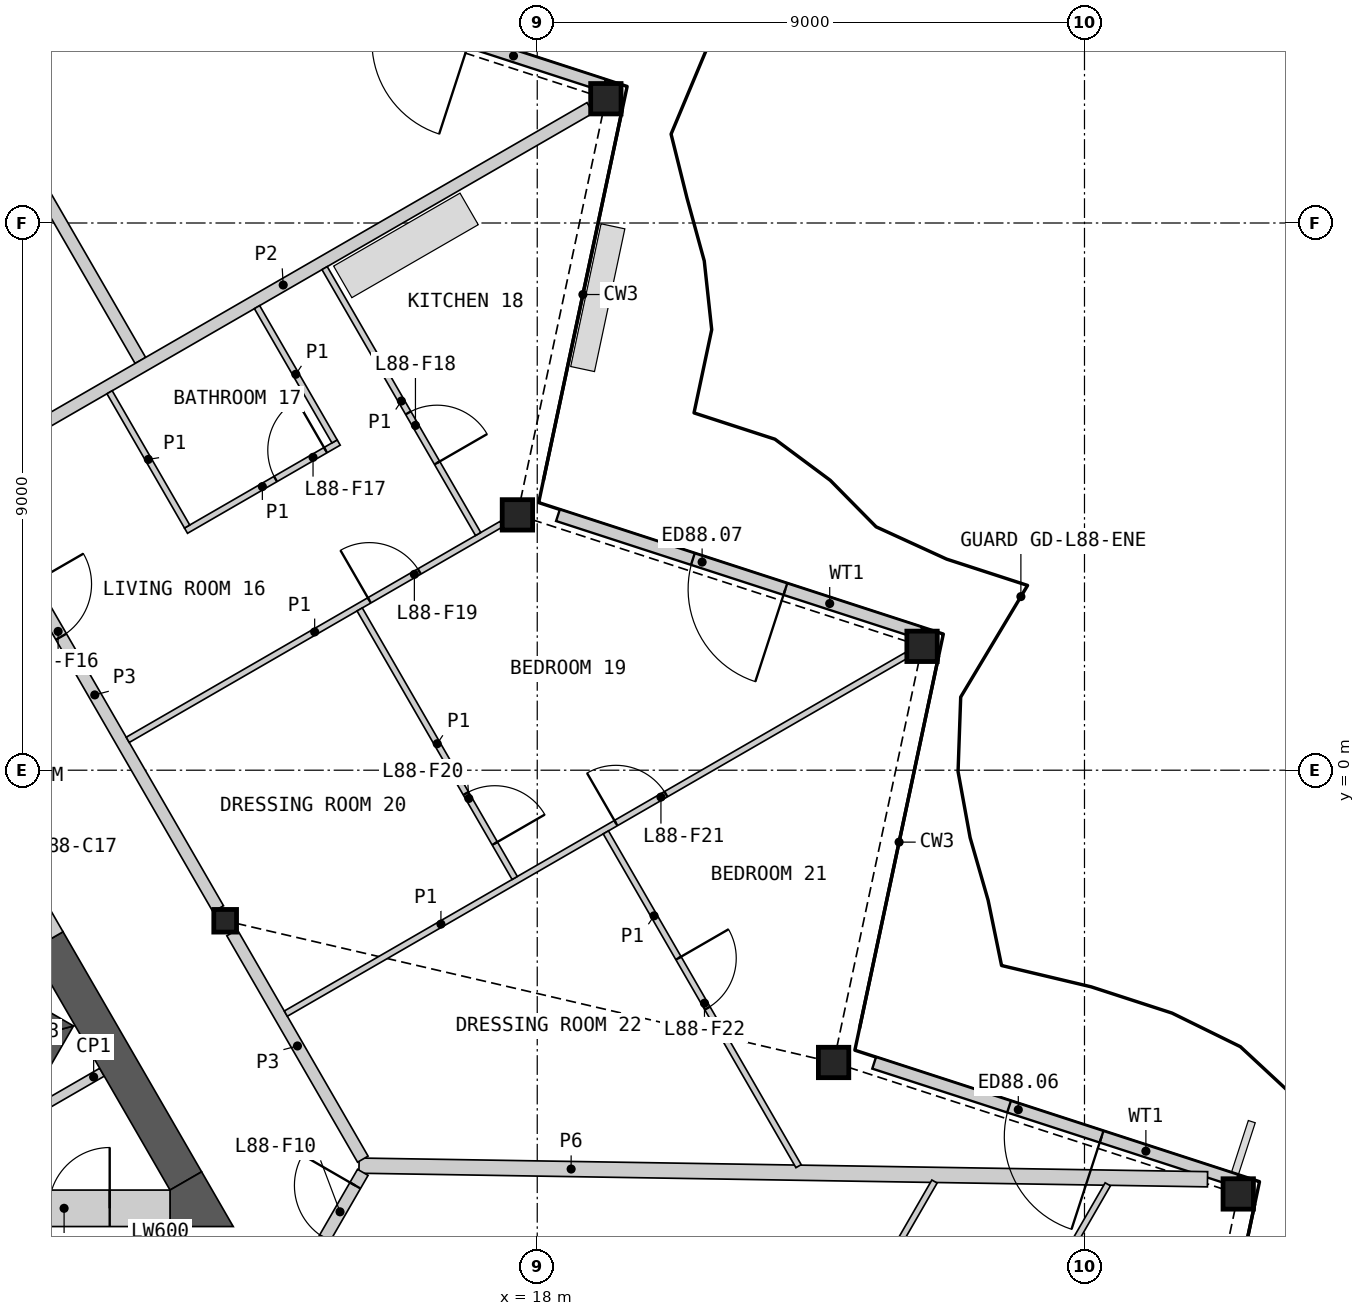
"""IFC4 building model, lengths in metres.
Left out: names, types, materials, properties, quantities, classifications, styles, units other than length and angle.
Written with IfcOpenShell. Run it as: python <this file> out.ifc"""

import sys

from ifc_helpers import new_model, si_unit, direction, frame, frame_2d, origin, origin_2d, place, context, subcontext, project, spatial, polyline, rectangle, hollow_rectangle, i_section, outline, extrude, element, fill, save


model = new_model("IFC4")
c1 = context("Model", 3, precision=1e-05, world=origin(), true_north=direction((0.0, 1.0)))
c2 = subcontext(c1, "Body", "Model", "MODEL_VIEW")
j1 = project(units=[si_unit("LENGTHUNIT", "METRE"), si_unit("PLANEANGLEUNIT", "RADIAN")], contexts=[c1])
p1 = place(None, origin())
s1 = spatial("IfcSite", under=j1, at=p1, CompositionType="ELEMENT")
p2 = place(p1, origin())
s2 = spatial("IfcBuilding", under=s1, at=p2, CompositionType="ELEMENT")
p3 = place(p2, frame((0.0, 0.0, 388.2)))
s3 = spatial("IfcBuildingStorey", under=s2, at=p3, CompositionType="ELEMENT", Elevation=388.2)
for number, where, z_axis, x_axis in (
    (1, (29.529, -6.969, 0.0), (0.0, 0.0, 1.0), (1.0, 0.0, 0.0)),
    (2, (22.874, -4.807, 0.0), (0.0, 0.0, 1.0), (1.0, 0.0, 0.0)),
    (3, (24.329, 2.037, 0.0), (0.0, 0.0, 1.0), (1.0, 0.0, 0.0)),
    (4, (17.674, 4.199, 0.0), (0.0, 0.0, 1.0), (1.0, 0.0, 0.0)),
    (5, (19.129, 11.044, 0.0), (0.0, 0.0, 1.0), (1.0, 0.0, 0.0)),
):
    element("IfcColumn", number, at=place(p3, frame(where, z_axis=z_axis, x_axis=x_axis)), inside=s3, PredefinedType="COLUMN", context=c2, shape_type="SweptSolid", body=[
        extrude(hollow_rectangle(XDim=0.5, YDim=0.5, WallThickness=0.03, at=origin_2d()), origin(), (0.0, 0.0, 1.0), 3.4),
    ])
p4 = place(p3, frame((12.868, -2.476, 0.0), z_axis=(0.0, 0.0, 1.0), x_axis=(1.0, 0.0, 0.0)))
e6 = element("IfcColumn", 6, at=p4, inside=s3, PredefinedType="COLUMN", context=c2, shape_type="SweptSolid", body=[
    extrude(i_section(OverallWidth=0.374, OverallDepth=0.372, WebThickness=0.016, FlangeThickness=0.026, at=origin_2d()), origin(), (0.0, 0.0, 1.0), 3.4),
])
p5 = place(p3, frame((29.5, -6.75, 0.0), z_axis=(0.0, 0.0, 1.0), x_axis=(-0.951060123915, 0.309005891041, 0.0)))
e7 = element("IfcWall", 7, at=p5, inside=s3, PredefinedType="SOLIDWALL", context=c2, shape_type="SweptSolid", body=[
    extrude(rectangle(XDim=6.265, YDim=0.2, at=frame_2d((3.133, 0.0))), origin(), (0.0, 0.0, 1.0), 2.634),
])
p6 = place(p5, frame((2.333, 0.0, 0.0)))
e8 = element("IfcOpeningElement", 8, at=p6, cuts=e7, PredefinedType="OPENING", context=c2, shape_type="SweptSolid", body=[
    extrude(rectangle(XDim=1.6, YDim=2.25, at=frame_2d((0.8, 1.125))), frame((0.0, 0.11, 0.0), z_axis=(0.0, -1.0, 0.0), x_axis=(1.0, 0.0, 0.0)), (0.0, 0.0, 1.0), 0.22),
])
p7 = place(p3, frame((24.3, 2.257, 0.0), z_axis=(0.0, 0.0, 1.0), x_axis=(-0.951060123915, 0.309005891041, 0.0)))
e9 = element("IfcWall", 9, at=p7, inside=s3, PredefinedType="SOLIDWALL", context=c2, shape_type="SweptSolid", body=[
    extrude(rectangle(XDim=6.265, YDim=0.2, at=frame_2d((3.133, 0.0))), origin(), (0.0, 0.0, 1.0), 2.634),
])
p8 = place(p7, frame((2.333, 0.0, 0.0)))
e10 = element("IfcOpeningElement", 10, at=p8, cuts=e9, PredefinedType="OPENING", context=c2, shape_type="SweptSolid", body=[
    extrude(rectangle(XDim=1.6, YDim=2.25, at=frame_2d((0.8, 1.125))), frame((0.0, 0.11, 0.0), z_axis=(0.0, -1.0, 0.0), x_axis=(1.0, 0.0, 0.0)), (0.0, 0.0, 1.0), 0.22),
])
p9 = place(p3, frame((19.099, 11.264, 0.0), z_axis=(0.0, 0.0, 1.0), x_axis=(-0.951056402988, 0.3090173431, 0.0)))
e11 = element("IfcWall", 11, at=p9, inside=s3, PredefinedType="SOLIDWALL", context=c2, shape_type="SweptSolid", body=[
    extrude(rectangle(XDim=6.265, YDim=0.2, at=frame_2d((3.133, 0.0))), origin(), (0.0, 0.0, 1.0), 2.634),
])
p10 = place(p9, frame((2.333, 0.0, 0.0)))
e12 = element("IfcOpeningElement", 12, at=p10, cuts=e11, PredefinedType="OPENING", context=c2, shape_type="SweptSolid", body=[
    extrude(rectangle(XDim=1.6, YDim=2.25, at=frame_2d((0.8, 1.125))), frame((0.0, 0.11, 0.0), z_axis=(0.0, -1.0, 0.0), x_axis=(1.0, 0.0, 0.0)), (0.0, 0.0, 1.0), 0.22),
])
p11 = place(p3, origin())
e13 = element("IfcWall", 13, at=p11, inside=s3, PredefinedType="SHEAR", context=c2, shape_type="SweptSolid", body=[
    extrude(outline(polyline([(8.83, -6.881), (10.374, -4.206), (10.032, -4.298), (8.738, -6.539), (8.83, -6.881)])), origin(), (0.0, 0.0, 1.0), 3.1),
])
p12 = place(p3, origin())
e14 = element("IfcWall", 14, at=p12, inside=s3, PredefinedType="SHEAR", context=c2, shape_type="SweptSolid", body=[
    extrude(outline(polyline([(10.032, -4.298), (10.374, -4.206), (5.307, -1.281), (5.182, -1.498), (10.032, -4.298)])), origin(), (0.0, 0.0, 1.0), 3.1),
])
p13 = place(p3, frame((10.842, -4.967, 0.0), z_axis=(0.0, 0.0, 1.0), x_axis=(-0.866098216386, -0.499873863663, 0.0)))
e15 = element("IfcWall", 15, at=p13, inside=s3, PredefinedType="PARTITIONING", context=c2, shape_type="SweptSolid", body=[
    extrude(rectangle(XDim=1.582, YDim=0.15, at=frame_2d((0.791, 0.0))), origin(), (0.0, 0.0, 1.0), 3.1),
])
p14 = place(p3, frame((12.221, -6.756, 0.0), z_axis=(0.0, 0.0, 1.0), x_axis=(-0.500020646047, 0.866013483456, 0.0)))
e16 = element("IfcWall", 16, at=p14, inside=s3, PredefinedType="SHEAR", context=c2, shape_type="SweptSolid", body=[
    extrude(rectangle(XDim=4.559, YDim=0.6, at=frame_2d((2.28, 0.0))), origin(), (0.0, 0.0, 1.0), 3.1),
])
p15 = place(p3, origin())
e17 = element("IfcWall", 17, at=p15, inside=s3, PredefinedType="SHEAR", context=c2, shape_type="SweptSolid", body=[
    extrude(outline(polyline([(11.961, -7.506), (11.961, -6.906), (12.48, -6.606), (13.0, -7.506), (11.961, -7.506)])), origin(), (0.0, 0.0, 1.0), 3.1),
])
p16 = place(p3, frame((9.369, -7.206, 0.0), z_axis=(0.0, 0.0, 1.0), x_axis=(1.0, 0.0, 0.0)))
e18 = element("IfcWall", 18, at=p16, inside=s3, PredefinedType="SHEAR", context=c2, shape_type="SweptSolid", body=[
    extrude(rectangle(XDim=2.592, YDim=0.6, at=frame_2d((1.296, 0.0))), origin(), (0.0, 0.0, 1.0), 3.1),
])
p17 = place(p16, frame((0.6, 0.0, 0.0)))
e19 = element("IfcOpeningElement", 19, at=p17, cuts=e18, PredefinedType="OPENING", context=c2, shape_type="SweptSolid", body=[
    extrude(rectangle(XDim=1.0, YDim=2.1, at=frame_2d((0.5, 1.05))), frame((0.0, 0.31, 0.0), z_axis=(0.0, -1.0, 0.0), x_axis=(1.0, 0.0, 0.0)), (0.0, 0.0, 1.0), 0.62),
])
p18 = place(p3, frame((9.941, -2.807, 0.0), z_axis=(0.0, 0.0, 1.0), x_axis=(-0.499994660107, 0.866028486751, 0.0)))
e20 = element("IfcWall", 20, at=p18, inside=s3, PredefinedType="SHEAR", context=c2, shape_type="SweptSolid", body=[
    extrude(rectangle(XDim=2.2, YDim=0.6, at=frame_2d((1.1, 0.0))), origin(), (0.0, 0.0, 1.0), 3.1),
])
p19 = place(p18, frame((0.6, 0.0, 0.0)))
e21 = element("IfcOpeningElement", 21, at=p19, cuts=e20, PredefinedType="OPENING", context=c2, shape_type="SweptSolid", body=[
    extrude(rectangle(XDim=1.0, YDim=2.1, at=frame_2d((0.5, 1.05))), frame((0.0, 0.31, 0.0), z_axis=(0.0, -1.0, 0.0), x_axis=(1.0, 0.0, 0.0)), (0.0, 0.0, 1.0), 0.62),
])
p20 = place(p3, frame((15.069, -6.503, 0.0), z_axis=(0.0, 0.0, 1.0), x_axis=(0.999870484296, -0.016093931549, 0.0)))
e22 = element("IfcWall", 22, at=p20, inside=s3, PredefinedType="PARTITIONING", context=c2, shape_type="SweptSolid", body=[
    extrude(rectangle(XDim=13.956, YDim=0.25, at=frame_2d((6.978, 0.0))), origin(), (0.0, 0.0, 1.0), 2.33),
])
p21 = place(p3, frame((8.692, 4.756, 0.0), z_axis=(0.0, 0.0, 1.0), x_axis=(0.500001682468, -0.866024432409, 0.0)))
e23 = element("IfcWall", 23, at=p21, inside=s3, PredefinedType="PARTITIONING", context=c2, shape_type="SweptSolid", body=[
    extrude(rectangle(XDim=8.124, YDim=0.2, at=frame_2d((4.062, 0.0))), origin(), (0.0, 0.0, 1.0), 3.1),
])
p22 = place(p21, frame((1.956, 0.0, 0.0)))
e24 = element("IfcOpeningElement", 24, at=p22, cuts=e23, PredefinedType="OPENING", context=c2, shape_type="SweptSolid", body=[
    extrude(rectangle(XDim=1.0, YDim=2.1, at=frame_2d((0.5, 1.05))), frame((0.0, 0.11, 0.0), z_axis=(0.0, -1.0, 0.0), x_axis=(1.0, 0.0, 0.0)), (0.0, 0.0, 1.0), 0.22),
])
p23 = place(p3, frame((12.981, -2.673, 0.0), z_axis=(0.0, 0.0, 1.0), x_axis=(0.499986217557, -0.866033360935, 0.0)))
e25 = element("IfcWall", 25, at=p23, inside=s3, PredefinedType="PARTITIONING", context=c2, shape_type="SweptSolid", body=[
    extrude(rectangle(XDim=4.3, YDim=0.2, at=frame_2d((2.15, 0.0))), origin(), (0.0, 0.0, 1.0), 3.1),
])
p24 = place(p3, frame((13.281, -9.819, 0.0), z_axis=(0.0, 0.0, 1.0), x_axis=(0.499948957823, 0.866054870994, 0.0)))
e26 = element("IfcWall", 26, at=p24, inside=s3, PredefinedType="PARTITIONING", context=c2, shape_type="SweptSolid", body=[
    extrude(rectangle(XDim=3.701, YDim=0.2, at=frame_2d((1.851, 0.0))), origin(), (0.0, 0.0, 1.0), 3.1),
])
p25 = place(p24, frame((2.451, 0.0, 0.0)))
e27 = element("IfcOpeningElement", 27, at=p25, cuts=e26, PredefinedType="OPENING", context=c2, shape_type="SweptSolid", body=[
    extrude(rectangle(XDim=1.0, YDim=2.1, at=frame_2d((0.5, 1.05))), frame((0.0, 0.11, 0.0), z_axis=(0.0, -1.0, 0.0), x_axis=(1.0, 0.0, 0.0)), (0.0, 0.0, 1.0), 0.22),
])
p26 = place(p3, frame((3.926, 19.811, 0.0), z_axis=(0.0, 0.0, 1.0), x_axis=(0.500001082559, -0.866024778768, 0.0)))
e28 = element("IfcWall", 28, at=p26, inside=s3, PredefinedType="PARTITIONING", context=c2, shape_type="SweptSolid", body=[
    extrude(rectangle(XDim=15.094, YDim=0.2, at=frame_2d((7.547, 0.0))), origin(), (0.0, 0.0, 1.0), 2.33),
])
p27 = place(p26, frame((3.761, 0.0, 0.0)))
e29 = element("IfcOpeningElement", 29, at=p27, cuts=e28, PredefinedType="OPENING", context=c2, shape_type="SweptSolid", body=[
    extrude(rectangle(XDim=0.95, YDim=2.1, at=frame_2d((0.475, 1.05))), frame((0.0, 0.11, 0.0), z_axis=(0.0, -1.0, 0.0), x_axis=(1.0, 0.0, 0.0)), (0.0, 0.0, 1.0), 0.22),
])
p28 = place(p3, frame((8.775, 5.066, 0.0), z_axis=(0.0, 0.0, 1.0), x_axis=(0.866023724155, 0.500002909193, 0.0)))
e30 = element("IfcWall", 30, at=p28, inside=s3, PredefinedType="PARTITIONING", context=c2, shape_type="SweptSolid", body=[
    extrude(rectangle(XDim=11.655, YDim=0.2, at=frame_2d((5.827, 0.0))), origin(), (0.0, 0.0, 1.0), 2.33),
])
p29 = place(p3, frame((13.865, -4.004, 0.0), z_axis=(0.0, 0.0, 1.0), x_axis=(0.866023404247, 0.500003463284, 0.0)))
e31 = element("IfcWall", 31, at=p29, inside=s3, PredefinedType="PARTITIONING", context=c2, shape_type="SweptSolid", body=[
    extrude(rectangle(XDim=11.782, YDim=0.1, at=frame_2d((5.891, 0.0))), origin(), (0.0, 0.0, 1.0), 2.33),
])
p30 = place(p29, frame((6.269, 0.0, 0.0)))
e32 = element("IfcOpeningElement", 32, at=p30, cuts=e31, PredefinedType="OPENING", context=c2, shape_type="SweptSolid", body=[
    extrude(rectangle(XDim=0.95, YDim=2.1, at=frame_2d((0.475, 1.05))), frame((0.0, 0.06, 0.0), z_axis=(0.0, -1.0, 0.0), x_axis=(1.0, 0.0, 0.0)), (0.0, 0.0, 1.0), 0.12),
])
p31 = place(p3, frame((23.512, -13.517, 0.0), z_axis=(0.0, 0.0, 1.0), x_axis=(0.49998445949, 0.866034375916, 0.0)))
e33 = element("IfcWall", 33, at=p31, inside=s3, PredefinedType="PARTITIONING", context=c2, shape_type="SweptSolid", body=[
    extrude(rectangle(XDim=7.743, YDim=0.1, at=frame_2d((3.872, 0.0))), origin(), (0.0, 0.0, 1.0), 2.33),
])
p32 = place(p31, frame((3.397, 0.0, 0.0)))
e34 = element("IfcOpeningElement", 34, at=p32, cuts=e33, PredefinedType="OPENING", context=c2, shape_type="SweptSolid", body=[
    extrude(rectangle(XDim=0.95, YDim=2.1, at=frame_2d((0.475, 1.05))), frame((0.0, 0.06, 0.0), z_axis=(0.0, -1.0, 0.0), x_axis=(1.0, 0.0, 0.0)), (0.0, 0.0, 1.0), 0.12),
])
p33 = place(p3, frame((11.265, 0.5, 0.0), z_axis=(0.0, 0.0, 1.0), x_axis=(0.866033839264, 0.499985389037, 0.0)))
e35 = element("IfcWall", 35, at=p33, inside=s3, PredefinedType="PARTITIONING", context=c2, shape_type="SweptSolid", body=[
    extrude(rectangle(XDim=7.1, YDim=0.1, at=frame_2d((3.55, 0.0))), origin(), (0.0, 0.0, 1.0), 2.33),
])
p34 = place(p33, frame((4.588, 0.0, 0.0)))
e36 = element("IfcOpeningElement", 36, at=p34, cuts=e35, PredefinedType="OPENING", context=c2, shape_type="SweptSolid", body=[
    extrude(rectangle(XDim=0.95, YDim=2.1, at=frame_2d((0.475, 1.05))), frame((0.0, 0.06, 0.0), z_axis=(0.0, -1.0, 0.0), x_axis=(1.0, 0.0, 0.0)), (0.0, 0.0, 1.0), 0.12),
])
p35 = place(p3, frame((21.354, -12.271, 0.0), z_axis=(0.0, 0.0, 1.0), x_axis=(0.499983931063, 0.866034680991, 0.0)))
e37 = element("IfcWall", 37, at=p35, inside=s3, PredefinedType="PARTITIONING", context=c2, shape_type="SweptSolid", body=[
    extrude(rectangle(XDim=6.358, YDim=0.1, at=frame_2d((3.179, 0.0))), origin(), (0.0, 0.0, 1.0), 2.33),
])
p36 = place(p35, frame((1.252, 0.0, 0.0)))
e38 = element("IfcOpeningElement", 38, at=p36, cuts=e37, PredefinedType="OPENING", context=c2, shape_type="SweptSolid", body=[
    extrude(rectangle(XDim=0.95, YDim=2.1, at=frame_2d((0.475, 1.05))), frame((0.0, 0.06, 0.0), z_axis=(0.0, -1.0, 0.0), x_axis=(1.0, 0.0, 0.0)), (0.0, 0.0, 1.0), 0.12),
])
p37 = place(p3, frame((19.128, -1.023, 0.0), z_axis=(0.0, 0.0, 1.0), x_axis=(0.499991387631, -0.866030376081, 0.0)))
e39 = element("IfcWall", 39, at=p37, inside=s3, PredefinedType="PARTITIONING", context=c2, shape_type="SweptSolid", body=[
    extrude(rectangle(XDim=6.339, YDim=0.1, at=frame_2d((3.169, 0.0))), origin(), (0.0, 0.0, 1.0), 2.33),
])
p38 = place(p37, frame((2.389, 0.0, 0.0)))
e40 = element("IfcOpeningElement", 40, at=p38, cuts=e39, PredefinedType="OPENING", context=c2, shape_type="SweptSolid", body=[
    extrude(rectangle(XDim=0.95, YDim=2.1, at=frame_2d((0.475, 1.05))), frame((0.0, 0.06, 0.0), z_axis=(0.0, -1.0, 0.0), x_axis=(1.0, 0.0, 0.0)), (0.0, 0.0, 1.0), 0.12),
])
p39 = place(p3, frame((15.08, 2.644, 0.0), z_axis=(0.0, 0.0, 1.0), x_axis=(0.500005610874, -0.86602216432, 0.0)))
e41 = element("IfcWall", 41, at=p39, inside=s3, PredefinedType="PARTITIONING", context=c2, shape_type="SweptSolid", body=[
    extrude(rectangle(XDim=5.1, YDim=0.1, at=frame_2d((2.55, 0.0))), origin(), (0.0, 0.0, 1.0), 2.33),
])
p40 = place(p39, frame((3.494, 0.0, 0.0)))
e42 = element("IfcOpeningElement", 42, at=p40, cuts=e41, PredefinedType="OPENING", context=c2, shape_type="SweptSolid", body=[
    extrude(rectangle(XDim=0.95, YDim=2.1, at=frame_2d((0.475, 1.05))), frame((0.0, 0.06, 0.0), z_axis=(0.0, -1.0, 0.0), x_axis=(1.0, 0.0, 0.0)), (0.0, 0.0, 1.0), 0.12),
])
p41 = place(p3, frame((14.503, 8.258, 0.0), z_axis=(0.0, 0.0, 1.0), x_axis=(0.500012591307, -0.866018134068, 0.0)))
e43 = element("IfcWall", 43, at=p41, inside=s3, PredefinedType="PARTITIONING", context=c2, shape_type="SweptSolid", body=[
    extrude(rectangle(XDim=5.05, YDim=0.1, at=frame_2d((2.525, 0.0))), origin(), (0.0, 0.0, 1.0), 2.33),
])
p42 = place(p41, frame((2.75, 0.0, 0.0)))
e44 = element("IfcOpeningElement", 44, at=p42, cuts=e43, PredefinedType="OPENING", context=c2, shape_type="SweptSolid", body=[
    extrude(rectangle(XDim=0.95, YDim=2.1, at=frame_2d((0.475, 1.05))), frame((0.0, 0.06, 0.0), z_axis=(0.0, -1.0, 0.0), x_axis=(1.0, 0.0, 0.0)), (0.0, 0.0, 1.0), 0.12),
])
p43 = place(p3, frame((12.223, 3.939, 0.0), z_axis=(0.0, 0.0, 1.0), x_axis=(0.866032775405, 0.499987231761, 0.0)))
e45 = element("IfcWall", 45, at=p43, inside=s3, PredefinedType="PARTITIONING", context=c2, shape_type="SweptSolid", body=[
    extrude(rectangle(XDim=2.9, YDim=0.1, at=frame_2d((1.45, 0.0))), origin(), (0.0, 0.0, 1.0), 2.33),
])
p44 = place(p43, frame((1.7, 0.0, 0.0)))
e46 = element("IfcOpeningElement", 46, at=p44, cuts=e45, PredefinedType="OPENING", context=c2, shape_type="SweptSolid", body=[
    extrude(rectangle(XDim=0.95, YDim=2.1, at=frame_2d((0.475, 1.05))), frame((0.0, 0.06, 0.0), z_axis=(0.0, -1.0, 0.0), x_axis=(1.0, 0.0, 0.0)), (0.0, 0.0, 1.0), 0.12),
])
for number, where, z_axis, x_axis in (
    (47, (10.967, 6.216, 0.0), (0.0, 0.0, 1.0), (0.5, -0.866, 0.0)),
    (48, (13.392, 7.616, 0.0), (0.0, 0.0, 1.0), (0.5, -0.866, 0.0)),
):
    element("IfcWall", number, at=place(p3, frame(where, z_axis=z_axis, x_axis=x_axis)), inside=s3, PredefinedType="PARTITIONING", context=c2, shape_type="SweptSolid", body=[
        extrude(rectangle(XDim=2.55, YDim=0.1, at=frame_2d((1.275, 0.0))), origin(), (0.0, 0.0, 1.0), 2.33),
    ])
p45 = place(p6, origin())
e49 = element("IfcDoor", 49, at=p45, inside=s3, OperationType="DOUBLE_DOOR_SINGLE_SWING", PredefinedType="DOOR", context=c2, shape_type="SweptSolid", body=[
    extrude(rectangle(XDim=1.6, YDim=2.25, at=frame_2d((0.8, 1.125))), frame((0.0, 0.025, 0.0), z_axis=(0.0, -1.0, 0.0), x_axis=(1.0, 0.0, 0.0)), (0.0, 0.0, 1.0), 0.05),
])
fill(e8, e49)
p46 = place(p8, origin())
e50 = element("IfcDoor", 50, at=p46, inside=s3, OperationType="DOUBLE_DOOR_SINGLE_SWING", PredefinedType="DOOR", context=c2, shape_type="SweptSolid", body=[
    extrude(rectangle(XDim=1.6, YDim=2.25, at=frame_2d((0.8, 1.125))), frame((0.0, 0.025, 0.0), z_axis=(0.0, -1.0, 0.0), x_axis=(1.0, 0.0, 0.0)), (0.0, 0.0, 1.0), 0.05),
])
fill(e10, e50)
p47 = place(p17, origin())
e51 = element("IfcDoor", 51, at=p47, inside=s3, OperationType="SINGLE_SWING_RIGHT", PredefinedType="DOOR", context=c2, shape_type="SweptSolid", body=[
    extrude(rectangle(XDim=1.0, YDim=2.1, at=frame_2d((0.5, 1.05))), frame((0.0, 0.055, 0.0), z_axis=(0.0, -1.0, 0.0), x_axis=(1.0, 0.0, 0.0)), (0.0, 0.0, 1.0), 0.05),
])
fill(e19, e51)
p48 = place(p25, origin())
e52 = element("IfcDoor", 52, at=p48, inside=s3, OperationType="SINGLE_SWING_RIGHT", PredefinedType="DOOR", context=c2, shape_type="SweptSolid", body=[
    extrude(rectangle(XDim=1.0, YDim=2.1, at=frame_2d((0.5, 1.05))), frame((0.0, 0.025, 0.0), z_axis=(0.0, -1.0, 0.0), x_axis=(1.0, 0.0, 0.0)), (0.0, 0.0, 1.0), 0.05),
])
fill(e27, e52)
p49 = place(p22, origin())
e53 = element("IfcDoor", 53, at=p49, inside=s3, OperationType="SINGLE_SWING_LEFT", PredefinedType="DOOR", context=c2, shape_type="SweptSolid", body=[
    extrude(rectangle(XDim=1.0, YDim=2.1, at=frame_2d((0.5, 1.05))), frame((0.0, 0.025, 0.0), z_axis=(0.0, -1.0, 0.0), x_axis=(1.0, 0.0, 0.0)), (0.0, 0.0, 1.0), 0.05),
])
fill(e24, e53)
p50 = place(p44, origin())
e54 = element("IfcDoor", 54, at=p50, inside=s3, OperationType="SINGLE_SWING_RIGHT", PredefinedType="DOOR", context=c2, shape_type="SweptSolid", body=[
    extrude(rectangle(XDim=0.95, YDim=2.1, at=frame_2d((0.475, 1.05))), frame((0.0, 0.025, 0.0), z_axis=(0.0, -1.0, 0.0), x_axis=(1.0, 0.0, 0.0)), (0.0, 0.0, 1.0), 0.05),
])
fill(e46, e54)
p51 = place(p42, origin())
e55 = element("IfcDoor", 55, at=p51, inside=s3, OperationType="SINGLE_SWING_RIGHT", PredefinedType="DOOR", context=c2, shape_type="SweptSolid", body=[
    extrude(rectangle(XDim=0.95, YDim=2.1, at=frame_2d((0.475, 1.05))), frame((0.0, 0.025, 0.0), z_axis=(0.0, -1.0, 0.0), x_axis=(1.0, 0.0, 0.0)), (0.0, 0.0, 1.0), 0.05),
])
fill(e44, e55)
p52 = place(p34, origin())
e56 = element("IfcDoor", 56, at=p52, inside=s3, OperationType="SINGLE_SWING_LEFT", PredefinedType="DOOR", context=c2, shape_type="SweptSolid", body=[
    extrude(rectangle(XDim=0.95, YDim=2.1, at=frame_2d((0.475, 1.05))), frame((0.0, 0.025, 0.0), z_axis=(0.0, -1.0, 0.0), x_axis=(1.0, 0.0, 0.0)), (0.0, 0.0, 1.0), 0.05),
])
fill(e36, e56)
p53 = place(p40, origin())
e57 = element("IfcDoor", 57, at=p53, inside=s3, OperationType="SINGLE_SWING_RIGHT", PredefinedType="DOOR", context=c2, shape_type="SweptSolid", body=[
    extrude(rectangle(XDim=0.95, YDim=2.1, at=frame_2d((0.475, 1.05))), frame((0.0, 0.025, 0.0), z_axis=(0.0, -1.0, 0.0), x_axis=(1.0, 0.0, 0.0)), (0.0, 0.0, 1.0), 0.05),
])
fill(e42, e57)
p54 = place(p30, origin())
e58 = element("IfcDoor", 58, at=p54, inside=s3, OperationType="SINGLE_SWING_LEFT", PredefinedType="DOOR", context=c2, shape_type="SweptSolid", body=[
    extrude(rectangle(XDim=0.95, YDim=2.1, at=frame_2d((0.475, 1.05))), frame((0.0, 0.025, 0.0), z_axis=(0.0, -1.0, 0.0), x_axis=(1.0, 0.0, 0.0)), (0.0, 0.0, 1.0), 0.05),
])
fill(e32, e58)
p55 = place(p38, origin())
e59 = element("IfcDoor", 59, at=p55, inside=s3, OperationType="SINGLE_SWING_LEFT", PredefinedType="DOOR", context=c2, shape_type="SweptSolid", body=[
    extrude(rectangle(XDim=0.95, YDim=2.1, at=frame_2d((0.475, 1.05))), frame((0.0, 0.025, 0.0), z_axis=(0.0, -1.0, 0.0), x_axis=(1.0, 0.0, 0.0)), (0.0, 0.0, 1.0), 0.05),
])
fill(e40, e59)
save(model, sys.argv[1])
